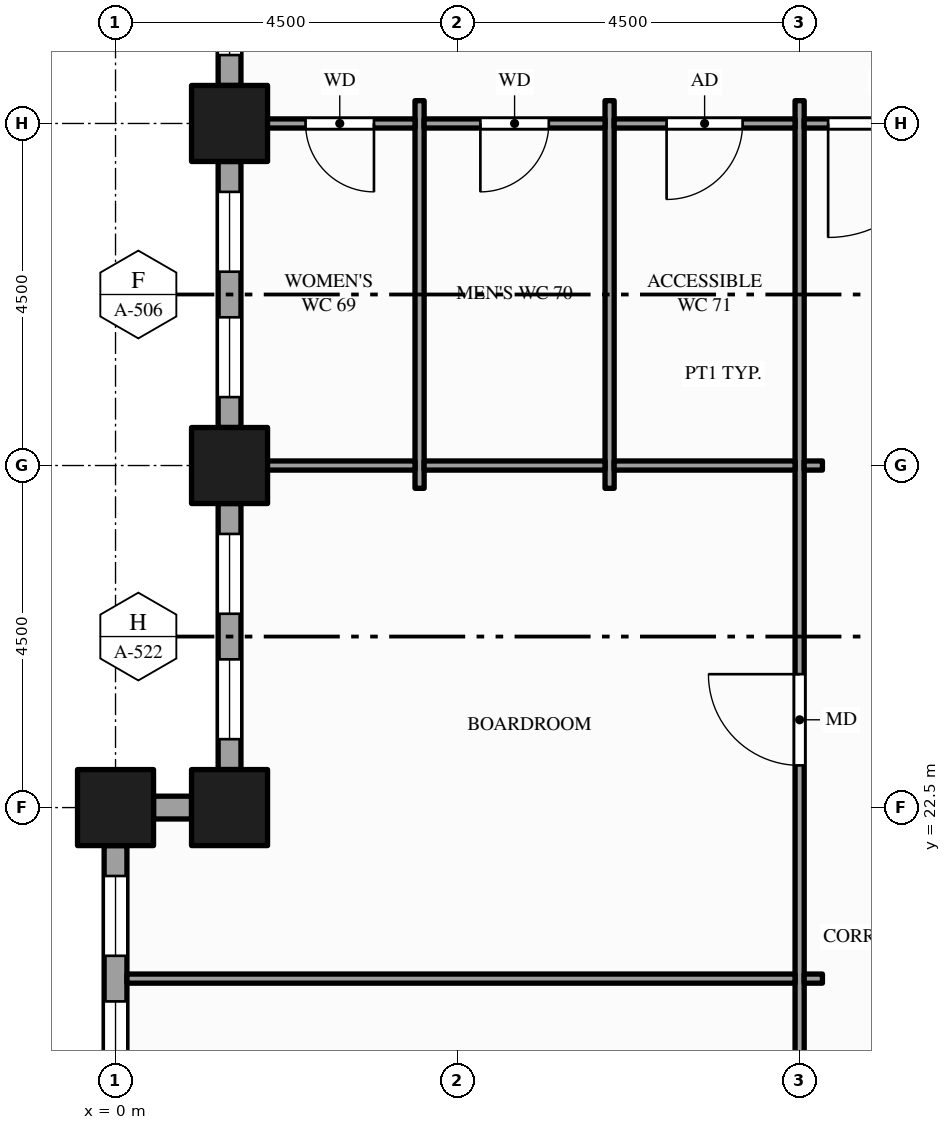
"""IFC4 building model, lengths in metres.
Left out: names, types, materials, properties, quantities, classifications, styles, units other than length and angle.
Written with IfcOpenShell. Run it as: python <this file> out.ifc"""

import sys

from ifc_helpers import new_model, si_unit, direction, frame, frame_2d, origin, origin_2d, place, context, subcontext, project, spatial, rectangle, hollow_rectangle, extrude, element, fill, save


model = new_model("IFC4")
c1 = context("Model", 3, precision=1e-05, world=origin(), true_north=direction((0.0, 1.0)))
c2 = subcontext(c1, "Body", "Model", "MODEL_VIEW")
j1 = project(units=[si_unit("LENGTHUNIT", "METRE"), si_unit("PLANEANGLEUNIT", "RADIAN")], contexts=[c1])
p1 = place(None, origin())
s1 = spatial("IfcSite", under=j1, at=p1, CompositionType="ELEMENT")
p2 = place(p1, origin())
s2 = spatial("IfcBuilding", under=s1, at=p2, CompositionType="ELEMENT")
p3 = place(p2, frame((0.0, 0.0, 103.0)))
s3 = spatial("IfcBuildingStorey", under=s2, at=p3, CompositionType="ELEMENT", Elevation=103.0)
for number, where, z_axis, x_axis in (
    (1, (0.0, 22.5, -0.15), (0.0, 0.0, 1.0), (1.0, 0.0, 0.0)),
    (2, (1.5, 22.5, -0.15), (0.0, 0.0, 1.0), (1.0, 0.0, 0.0)),
    (3, (1.5, 27.0, -0.15), (0.0, 0.0, 1.0), (1.0, 0.0, 0.0)),
    (4, (1.5, 31.5, -0.15), (0.0, 0.0, 1.0), (1.0, 0.0, 0.0)),
):
    element("IfcColumn", number, at=place(p3, frame(where, z_axis=z_axis, x_axis=x_axis)), inside=s3, PredefinedType="COLUMN", context=c2, shape_type="SweptSolid", body=[
        extrude(hollow_rectangle(XDim=1.0, YDim=1.0, WallThickness=0.05, at=origin_2d()), origin(), (0.0, 0.0, 1.0), 4.0),
    ])
p4 = place(p3, frame((1.5, 36.0, 0.0), z_axis=(0.0, 0.0, 1.0), x_axis=(0.0, -1.0, 0.0)))
e5 = element("IfcWall", 5, at=p4, inside=s3, PredefinedType="STANDARD", context=c2, shape_type="SweptSolid", body=[
    extrude(rectangle(XDim=4.0, YDim=0.3, at=frame_2d((2.0, 0.0))), origin(), (0.0, 0.0, 1.0), 3.154),
])
p5 = place(p4, frame((0.4, 0.0, 0.9)))
e6 = element("IfcOpeningElement", 6, at=p5, cuts=e5, PredefinedType="OPENING", context=c2, shape_type="SweptSolid", body=[
    extrude(rectangle(XDim=1.55, YDim=2.0, at=frame_2d((0.775, 1.0))), frame((0.0, 0.16, 0.0), z_axis=(0.0, -1.0, 0.0), x_axis=(1.0, 0.0, 0.0)), (0.0, 0.0, 1.0), 0.32),
])
p6 = place(p4, frame((2.55, 0.0, 0.9)))
e7 = element("IfcOpeningElement", 7, at=p6, cuts=e5, PredefinedType="OPENING", context=c2, shape_type="SweptSolid", body=[
    extrude(rectangle(XDim=1.05, YDim=2.0, at=frame_2d((0.525, 1.0))), frame((0.0, 0.16, 0.0), z_axis=(0.0, -1.0, 0.0), x_axis=(1.0, 0.0, 0.0)), (0.0, 0.0, 1.0), 0.32),
])
p7 = place(p3, frame((1.5, 31.0, 0.0), z_axis=(0.0, 0.0, 1.0), x_axis=(0.0, -1.0, 0.0)))
e8 = element("IfcWall", 8, at=p7, inside=s3, PredefinedType="STANDARD", context=c2, shape_type="SweptSolid", body=[
    extrude(rectangle(XDim=3.5, YDim=0.3, at=frame_2d((1.75, 0.0))), origin(), (0.0, 0.0, 1.0), 3.154),
])
p8 = place(p7, frame((0.4, 0.0, 0.9)))
e9 = element("IfcOpeningElement", 9, at=p8, cuts=e8, PredefinedType="OPENING", context=c2, shape_type="SweptSolid", body=[
    extrude(rectangle(XDim=1.05, YDim=2.0, at=frame_2d((0.525, 1.0))), frame((0.0, 0.16, 0.0), z_axis=(0.0, -1.0, 0.0), x_axis=(1.0, 0.0, 0.0)), (0.0, 0.0, 1.0), 0.32),
])
p9 = place(p7, frame((2.05, 0.0, 0.9)))
e10 = element("IfcOpeningElement", 10, at=p9, cuts=e8, PredefinedType="OPENING", context=c2, shape_type="SweptSolid", body=[
    extrude(rectangle(XDim=1.05, YDim=2.0, at=frame_2d((0.525, 1.0))), frame((0.0, 0.16, 0.0), z_axis=(0.0, -1.0, 0.0), x_axis=(1.0, 0.0, 0.0)), (0.0, 0.0, 1.0), 0.32),
])
p10 = place(p3, frame((1.5, 26.5, 0.0), z_axis=(0.0, 0.0, 1.0), x_axis=(0.0, -1.0, 0.0)))
e11 = element("IfcWall", 11, at=p10, inside=s3, PredefinedType="STANDARD", context=c2, shape_type="SweptSolid", body=[
    extrude(rectangle(XDim=3.5, YDim=0.3, at=frame_2d((1.75, 0.0))), origin(), (0.0, 0.0, 1.0), 3.154),
])
p11 = place(p10, frame((0.4, 0.0, 0.9)))
e12 = element("IfcOpeningElement", 12, at=p11, cuts=e11, PredefinedType="OPENING", context=c2, shape_type="SweptSolid", body=[
    extrude(rectangle(XDim=1.05, YDim=2.0, at=frame_2d((0.525, 1.0))), frame((0.0, 0.16, 0.0), z_axis=(0.0, -1.0, 0.0), x_axis=(1.0, 0.0, 0.0)), (0.0, 0.0, 1.0), 0.32),
])
p12 = place(p10, frame((2.05, 0.0, 0.9)))
e13 = element("IfcOpeningElement", 13, at=p12, cuts=e11, PredefinedType="OPENING", context=c2, shape_type="SweptSolid", body=[
    extrude(rectangle(XDim=1.05, YDim=2.0, at=frame_2d((0.525, 1.0))), frame((0.0, 0.16, 0.0), z_axis=(0.0, -1.0, 0.0), x_axis=(1.0, 0.0, 0.0)), (0.0, 0.0, 1.0), 0.32),
])
p13 = place(p3, frame((1.0, 22.5, 0.0), z_axis=(0.0, 0.0, 1.0), x_axis=(-1.0, 0.0, 0.0)))
e14 = element("IfcWall", 14, at=p13, inside=s3, PredefinedType="STANDARD", context=c2, shape_type="SweptSolid", body=[
    extrude(rectangle(XDim=0.5, YDim=0.3, at=frame_2d((0.25, 0.0))), origin(), (0.0, 0.0, 1.0), 3.154),
])
p14 = place(p3, frame((0.0, 22.0, 0.0), z_axis=(0.0, 0.0, 1.0), x_axis=(0.0, -1.0, 0.0)))
e15 = element("IfcWall", 15, at=p14, inside=s3, PredefinedType="STANDARD", context=c2, shape_type="SweptSolid", body=[
    extrude(rectangle(XDim=3.5, YDim=0.3, at=frame_2d((1.75, 0.0))), origin(), (0.0, 0.0, 1.0), 3.154),
])
p15 = place(p14, frame((0.4, 0.0, 0.9)))
e16 = element("IfcOpeningElement", 16, at=p15, cuts=e15, PredefinedType="OPENING", context=c2, shape_type="SweptSolid", body=[
    extrude(rectangle(XDim=1.05, YDim=2.0, at=frame_2d((0.525, 1.0))), frame((0.0, 0.16, 0.0), z_axis=(0.0, -1.0, 0.0), x_axis=(1.0, 0.0, 0.0)), (0.0, 0.0, 1.0), 0.32),
])
p16 = place(p14, frame((2.05, 0.0, 0.9)))
e17 = element("IfcOpeningElement", 17, at=p16, cuts=e15, PredefinedType="OPENING", context=c2, shape_type="SweptSolid", body=[
    extrude(rectangle(XDim=1.05, YDim=2.0, at=frame_2d((0.525, 1.0))), frame((0.0, 0.16, 0.0), z_axis=(0.0, -1.0, 0.0), x_axis=(1.0, 0.0, 0.0)), (0.0, 0.0, 1.0), 0.32),
])
for number, where, z_axis, x_axis in (
    (18, (4.0, 26.7, 0.0), (0.0, 0.0, 1.0), (0.0, 1.0, 0.0)),
    (19, (6.5, 26.7, 0.0), (0.0, 0.0, 1.0), (0.0, 1.0, 0.0)),
):
    element("IfcWall", number, at=place(p3, frame(where, z_axis=z_axis, x_axis=x_axis)), inside=s3, PredefinedType="PARTITIONING", context=c2, shape_type="SweptSolid", body=[
        extrude(rectangle(XDim=5.1, YDim=0.12, at=frame_2d((2.55, 0.0))), origin(), (0.0, 0.0, 1.0), 3.85),
    ])
p17 = place(p3, frame((9.0, 8.7, 0.0), z_axis=(0.0, 0.0, 1.0), x_axis=(0.0, 1.0, 0.0)))
e20 = element("IfcWall", 20, at=p17, inside=s3, PredefinedType="PARTITIONING", context=c2, shape_type="SweptSolid", body=[
    extrude(rectangle(XDim=23.1, YDim=0.12, at=frame_2d((11.55, 0.0))), origin(), (0.0, 0.0, 1.0), 2.6),
])
p18 = place(p17, frame((2.05, 0.0, 0.0)))
e21 = element("IfcOpeningElement", 21, at=p18, cuts=e20, PredefinedType="OPENING", context=c2, shape_type="SweptSolid", body=[
    extrude(rectangle(XDim=1.0, YDim=2.1, at=frame_2d((0.5, 1.05))), frame((0.0, 0.07, 0.0), z_axis=(0.0, -1.0, 0.0), x_axis=(1.0, 0.0, 0.0)), (0.0, 0.0, 1.0), 0.14),
])
p19 = place(p17, frame((7.675, 0.0, 0.0)))
e22 = element("IfcOpeningElement", 22, at=p19, cuts=e20, PredefinedType="OPENING", context=c2, shape_type="SweptSolid", body=[
    extrude(rectangle(XDim=1.0, YDim=2.1, at=frame_2d((0.5, 1.05))), frame((0.0, 0.07, 0.0), z_axis=(0.0, -1.0, 0.0), x_axis=(1.0, 0.0, 0.0)), (0.0, 0.0, 1.0), 0.14),
])
p20 = place(p17, frame((14.355, 0.0, 0.0)))
e23 = element("IfcOpeningElement", 23, at=p20, cuts=e20, PredefinedType="OPENING", context=c2, shape_type="SweptSolid", body=[
    extrude(rectangle(XDim=1.2, YDim=2.1, at=frame_2d((0.6, 1.05))), frame((0.0, 0.07, 0.0), z_axis=(0.0, -1.0, 0.0), x_axis=(1.0, 0.0, 0.0)), (0.0, 0.0, 1.0), 0.14),
])
p21 = place(p3, frame((0.15, 20.25, 0.0), z_axis=(0.0, 0.0, 1.0), x_axis=(1.0, 0.0, 0.0)))
e24 = element("IfcWall", 24, at=p21, inside=s3, PredefinedType="PARTITIONING", context=c2, shape_type="SweptSolid", body=[
    extrude(rectangle(XDim=8.79, YDim=0.12, at=frame_2d((4.395, 0.0))), origin(), (0.0, 0.0, 1.0), 2.938),
])
p22 = place(p3, frame((9.06, 20.25, 0.0), z_axis=(0.0, 0.0, 1.0), x_axis=(1.0, 0.0, 0.0)))
e25 = element("IfcWall", 25, at=p22, inside=s3, PredefinedType="PARTITIONING", context=c2, shape_type="SweptSolid", body=[
    extrude(rectangle(XDim=0.24, YDim=0.12, at=frame_2d((0.12, 0.0))), origin(), (0.0, 0.0, 1.0), 2.938),
])
p23 = place(p3, frame((1.65, 27.0, 0.0), z_axis=(0.0, 0.0, 1.0), x_axis=(1.0, 0.0, 0.0)))
e26 = element("IfcWall", 26, at=p23, inside=s3, PredefinedType="PARTITIONING", context=c2, shape_type="SweptSolid", body=[
    extrude(rectangle(XDim=2.29, YDim=0.12, at=frame_2d((1.145, 0.0))), origin(), (0.0, 0.0, 1.0), 2.938),
])
for number, where, z_axis, x_axis in (
    (27, (4.06, 27.0, 0.0), (0.0, 0.0, 1.0), (1.0, 0.0, 0.0)),
    (28, (6.56, 27.0, 0.0), (0.0, 0.0, 1.0), (1.0, 0.0, 0.0)),
):
    element("IfcWall", number, at=place(p3, frame(where, z_axis=z_axis, x_axis=x_axis)), inside=s3, PredefinedType="PARTITIONING", context=c2, shape_type="SweptSolid", body=[
        extrude(rectangle(XDim=2.38, YDim=0.12, at=frame_2d((1.19, 0.0))), origin(), (0.0, 0.0, 1.0), 2.938),
    ])
p24 = place(p3, frame((9.06, 27.0, 0.0), z_axis=(0.0, 0.0, 1.0), x_axis=(1.0, 0.0, 0.0)))
e29 = element("IfcWall", 29, at=p24, inside=s3, PredefinedType="PARTITIONING", context=c2, shape_type="SweptSolid", body=[
    extrude(rectangle(XDim=0.24, YDim=0.12, at=frame_2d((0.12, 0.0))), origin(), (0.0, 0.0, 1.0), 2.938),
])
p25 = place(p3, frame((1.65, 31.5, 0.0), z_axis=(0.0, 0.0, 1.0), x_axis=(1.0, 0.0, 0.0)))
e30 = element("IfcWall", 30, at=p25, inside=s3, PredefinedType="PARTITIONING", context=c2, shape_type="SweptSolid", body=[
    extrude(rectangle(XDim=2.29, YDim=0.12, at=frame_2d((1.145, 0.0))), origin(), (0.0, 0.0, 1.0), 2.938),
])
p26 = place(p25, frame((0.85, 0.0, 0.0)))
e31 = element("IfcOpeningElement", 31, at=p26, cuts=e30, PredefinedType="OPENING", context=c2, shape_type="SweptSolid", body=[
    extrude(rectangle(XDim=0.9, YDim=2.1, at=frame_2d((0.45, 1.05))), frame((0.0, 0.07, 0.0), z_axis=(0.0, -1.0, 0.0), x_axis=(1.0, 0.0, 0.0)), (0.0, 0.0, 1.0), 0.14),
])
p27 = place(p3, frame((4.06, 31.5, 0.0), z_axis=(0.0, 0.0, 1.0), x_axis=(1.0, 0.0, 0.0)))
e32 = element("IfcWall", 32, at=p27, inside=s3, PredefinedType="PARTITIONING", context=c2, shape_type="SweptSolid", body=[
    extrude(rectangle(XDim=2.38, YDim=0.12, at=frame_2d((1.19, 0.0))), origin(), (0.0, 0.0, 1.0), 2.938),
])
p28 = place(p27, frame((0.74, 0.0, 0.0)))
e33 = element("IfcOpeningElement", 33, at=p28, cuts=e32, PredefinedType="OPENING", context=c2, shape_type="SweptSolid", body=[
    extrude(rectangle(XDim=0.9, YDim=2.1, at=frame_2d((0.45, 1.05))), frame((0.0, 0.07, 0.0), z_axis=(0.0, -1.0, 0.0), x_axis=(1.0, 0.0, 0.0)), (0.0, 0.0, 1.0), 0.14),
])
p29 = place(p3, frame((6.56, 31.5, 0.0), z_axis=(0.0, 0.0, 1.0), x_axis=(1.0, 0.0, 0.0)))
e34 = element("IfcWall", 34, at=p29, inside=s3, PredefinedType="PARTITIONING", context=c2, shape_type="SweptSolid", body=[
    extrude(rectangle(XDim=2.38, YDim=0.12, at=frame_2d((1.19, 0.0))), origin(), (0.0, 0.0, 1.0), 2.938),
])
p30 = place(p29, frame((0.69, 0.0, 0.0)))
e35 = element("IfcOpeningElement", 35, at=p30, cuts=e34, PredefinedType="OPENING", context=c2, shape_type="SweptSolid", body=[
    extrude(rectangle(XDim=1.0, YDim=2.1, at=frame_2d((0.5, 1.05))), frame((0.0, 0.07, 0.0), z_axis=(0.0, -1.0, 0.0), x_axis=(1.0, 0.0, 0.0)), (0.0, 0.0, 1.0), 0.14),
])
p31 = place(p3, frame((9.06, 31.5, 0.0), z_axis=(0.0, 0.0, 1.0), x_axis=(1.0, 0.0, 0.0)))
e36 = element("IfcWall", 36, at=p31, inside=s3, PredefinedType="PARTITIONING", context=c2, shape_type="SweptSolid", body=[
    extrude(rectangle(XDim=2.13, YDim=0.12, at=frame_2d((1.065, 0.0))), origin(), (0.0, 0.0, 1.0), 2.938),
])
p32 = place(p31, frame((0.315, 0.0, 0.0)))
e37 = element("IfcOpeningElement", 37, at=p32, cuts=e36, PredefinedType="OPENING", context=c2, shape_type="SweptSolid", body=[
    extrude(rectangle(XDim=1.5, YDim=2.1, at=frame_2d((0.75, 1.05))), frame((0.0, 0.07, 0.0), z_axis=(0.0, -1.0, 0.0), x_axis=(1.0, 0.0, 0.0)), (0.0, 0.0, 1.0), 0.14),
])
p33 = place(p6, origin())
e38 = element("IfcWindow", 38, at=p33, inside=s3, PartitioningType="SINGLE_PANEL", PredefinedType="WINDOW", context=c2, shape_type="SweptSolid", body=[
    extrude(rectangle(XDim=1.05, YDim=2.0, at=frame_2d((0.525, 1.0))), frame((0.0, 0.03, 0.0), z_axis=(0.0, -1.0, 0.0), x_axis=(1.0, 0.0, 0.0)), (0.0, 0.0, 1.0), 0.06),
])
fill(e7, e38)
p34 = place(p8, origin())
e39 = element("IfcWindow", 39, at=p34, inside=s3, PartitioningType="SINGLE_PANEL", PredefinedType="WINDOW", context=c2, shape_type="SweptSolid", body=[
    extrude(rectangle(XDim=1.05, YDim=2.0, at=frame_2d((0.525, 1.0))), frame((0.0, 0.03, 0.0), z_axis=(0.0, -1.0, 0.0), x_axis=(1.0, 0.0, 0.0)), (0.0, 0.0, 1.0), 0.06),
])
fill(e9, e39)
p35 = place(p9, origin())
e40 = element("IfcWindow", 40, at=p35, inside=s3, PartitioningType="SINGLE_PANEL", PredefinedType="WINDOW", context=c2, shape_type="SweptSolid", body=[
    extrude(rectangle(XDim=1.05, YDim=2.0, at=frame_2d((0.525, 1.0))), frame((0.0, 0.03, 0.0), z_axis=(0.0, -1.0, 0.0), x_axis=(1.0, 0.0, 0.0)), (0.0, 0.0, 1.0), 0.06),
])
fill(e10, e40)
p36 = place(p11, origin())
e41 = element("IfcWindow", 41, at=p36, inside=s3, PartitioningType="SINGLE_PANEL", PredefinedType="WINDOW", context=c2, shape_type="SweptSolid", body=[
    extrude(rectangle(XDim=1.05, YDim=2.0, at=frame_2d((0.525, 1.0))), frame((0.0, 0.03, 0.0), z_axis=(0.0, -1.0, 0.0), x_axis=(1.0, 0.0, 0.0)), (0.0, 0.0, 1.0), 0.06),
])
fill(e12, e41)
p37 = place(p12, origin())
e42 = element("IfcWindow", 42, at=p37, inside=s3, PartitioningType="SINGLE_PANEL", PredefinedType="WINDOW", context=c2, shape_type="SweptSolid", body=[
    extrude(rectangle(XDim=1.05, YDim=2.0, at=frame_2d((0.525, 1.0))), frame((0.0, 0.03, 0.0), z_axis=(0.0, -1.0, 0.0), x_axis=(1.0, 0.0, 0.0)), (0.0, 0.0, 1.0), 0.06),
])
fill(e13, e42)
p38 = place(p15, origin())
e43 = element("IfcWindow", 43, at=p38, inside=s3, PartitioningType="SINGLE_PANEL", PredefinedType="WINDOW", context=c2, shape_type="SweptSolid", body=[
    extrude(rectangle(XDim=1.05, YDim=2.0, at=frame_2d((0.525, 1.0))), frame((0.0, 0.03, 0.0), z_axis=(0.0, -1.0, 0.0), x_axis=(1.0, 0.0, 0.0)), (0.0, 0.0, 1.0), 0.06),
])
fill(e16, e43)
p39 = place(p16, origin())
e44 = element("IfcWindow", 44, at=p39, inside=s3, PartitioningType="SINGLE_PANEL", PredefinedType="WINDOW", context=c2, shape_type="SweptSolid", body=[
    extrude(rectangle(XDim=1.05, YDim=2.0, at=frame_2d((0.525, 1.0))), frame((0.0, 0.03, 0.0), z_axis=(0.0, -1.0, 0.0), x_axis=(1.0, 0.0, 0.0)), (0.0, 0.0, 1.0), 0.06),
])
fill(e17, e44)
p40 = place(p32, origin())
e45 = element("IfcDoor", 45, at=p40, inside=s3, OperationType="SINGLE_SWING_LEFT", PredefinedType="DOOR", context=c2, shape_type="SweptSolid", body=[
    extrude(rectangle(XDim=1.5, YDim=2.1, at=frame_2d((0.75, 1.05))), frame((0.0, 0.025, 0.0), z_axis=(0.0, -1.0, 0.0), x_axis=(1.0, 0.0, 0.0)), (0.0, 0.0, 1.0), 0.05),
])
fill(e37, e45)
p41 = place(p20, origin())
e46 = element("IfcDoor", 46, at=p41, inside=s3, OperationType="SINGLE_SWING_RIGHT", PredefinedType="DOOR", context=c2, shape_type="SweptSolid", body=[
    extrude(rectangle(XDim=1.2, YDim=2.1, at=frame_2d((0.6, 1.05))), frame((0.0, 0.025, 0.0), z_axis=(0.0, -1.0, 0.0), x_axis=(1.0, 0.0, 0.0)), (0.0, 0.0, 1.0), 0.05),
])
fill(e23, e46)
p42 = place(p26, origin())
e47 = element("IfcDoor", 47, at=p42, inside=s3, OperationType="SINGLE_SWING_RIGHT", PredefinedType="DOOR", context=c2, shape_type="SweptSolid", body=[
    extrude(rectangle(XDim=0.9, YDim=2.1, at=frame_2d((0.45, 1.05))), frame((0.0, 0.025, 0.0), z_axis=(0.0, -1.0, 0.0), x_axis=(1.0, 0.0, 0.0)), (0.0, 0.0, 1.0), 0.05),
])
fill(e31, e47)
p43 = place(p28, origin())
e48 = element("IfcDoor", 48, at=p43, inside=s3, OperationType="SINGLE_SWING_LEFT", PredefinedType="DOOR", context=c2, shape_type="SweptSolid", body=[
    extrude(rectangle(XDim=0.9, YDim=2.1, at=frame_2d((0.45, 1.05))), frame((0.0, 0.025, 0.0), z_axis=(0.0, -1.0, 0.0), x_axis=(1.0, 0.0, 0.0)), (0.0, 0.0, 1.0), 0.05),
])
fill(e33, e48)
p44 = place(p30, origin())
e49 = element("IfcDoor", 49, at=p44, inside=s3, OperationType="SINGLE_SWING_LEFT", PredefinedType="DOOR", context=c2, shape_type="SweptSolid", body=[
    extrude(rectangle(XDim=1.0, YDim=2.1, at=frame_2d((0.5, 1.05))), frame((0.0, 0.025, 0.0), z_axis=(0.0, -1.0, 0.0), x_axis=(1.0, 0.0, 0.0)), (0.0, 0.0, 1.0), 0.05),
])
fill(e35, e49)
save(model, sys.argv[1])
